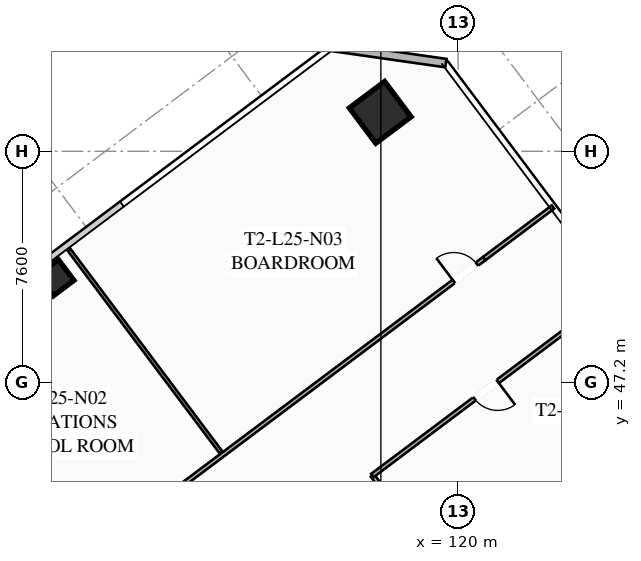
"""IFC4 building model, lengths in metres.
Left out: names, types, materials, properties, quantities, classifications, styles, units other than length and angle.
Written with IfcOpenShell. Run it as: python <this file> out.ifc"""

import sys

from ifc_helpers import new_model, si_unit, direction, frame, frame_2d, origin, origin_2d, place, context, subcontext, project, spatial, rectangle, hollow_rectangle, extrude, element, fill, save


model = new_model("IFC4")
c1 = context("Model", 3, precision=1e-05, world=origin(), true_north=direction((0.0, 1.0)))
c2 = subcontext(c1, "Body", "Model", "MODEL_VIEW")
j1 = project(units=[si_unit("LENGTHUNIT", "METRE"), si_unit("PLANEANGLEUNIT", "RADIAN")], contexts=[c1])
p1 = place(None, origin())
s1 = spatial("IfcSite", under=j1, at=p1, CompositionType="ELEMENT")
p2 = place(p1, origin())
s2 = spatial("IfcBuilding", under=s1, at=p2, CompositionType="ELEMENT")
p3 = place(p2, frame((0.0, 0.0, 95.6)))
s3 = spatial("IfcBuildingStorey", under=s2, at=p3, CompositionType="ELEMENT", Elevation=95.6)
p4 = place(p3, frame((117.44, 56.08, 0.0), z_axis=(0.0, 0.0, 1.0), x_axis=(0.799999996291, 0.600000004945, 0.0)))
e1 = element("IfcColumn", 1, at=p4, inside=s3, PredefinedType="COLUMN", context=c2, shape_type="SweptSolid", body=[
    extrude(hollow_rectangle(XDim=1.45, YDim=1.45, WallThickness=0.055, at=origin_2d()), origin(), (0.0, 0.0, 1.0), 3.35),
])
p5 = place(p3, frame((106.77, 50.64, 0.0), z_axis=(0.0, 0.0, 1.0), x_axis=(0.799999996291, 0.600000004945, 0.0)))
e2 = element("IfcColumn", 2, at=p5, inside=s3, PredefinedType="COLUMN", context=c2, shape_type="SweptSolid", body=[
    extrude(hollow_rectangle(XDim=0.85, YDim=0.85, WallThickness=0.035, at=origin_2d()), origin(), (0.0, 0.0, 1.0), 3.35),
])
p6 = place(p3, frame((115.82, 58.24, 0.0), z_axis=(0.0, 0.0, 1.0), x_axis=(0.989948214866, -0.141430307517, 0.0)))
e3 = element("IfcWall", 3, at=p6, inside=s3, PredefinedType="SOLIDWALL", context=c2, shape_type="SweptSolid", body=[
    extrude(rectangle(XDim=3.818, YDim=0.28, at=frame_2d((1.909, 0.0))), origin(), (0.0, 0.0, 1.0), 3.35),
])
p7 = place(p3, frame((119.824, 40.618, 0.0), z_axis=(0.0, 0.0, 1.0), x_axis=(-0.599982243973, 0.800013316712, 0.0)))
e4 = element("IfcWall", 4, at=p7, inside=s3, PredefinedType="PARTITIONING", context=c2, shape_type="SweptSolid", body=[
    extrude(rectangle(XDim=4.4, YDim=0.135, at=frame_2d((2.2, 0.0))), origin(), (0.0, 0.0, 1.0), 2.703),
])
p8 = place(p3, frame((98.276, 34.332, 0.0), z_axis=(0.0, 0.0, 1.0), x_axis=(0.800003113347, 0.599995848849, 0.0)))
e5 = element("IfcWall", 5, at=p8, inside=s3, PredefinedType="PARTITIONING", context=c2, shape_type="SweptSolid", body=[
    extrude(rectangle(XDim=28.23, YDim=0.135, at=frame_2d((14.115, 0.0))), origin(), (0.0, 0.0, 1.0), 2.703),
])
p9 = place(p8, frame((0.3, 0.0, 0.0)))
e6 = element("IfcOpeningElement", 6, at=p9, cuts=e5, PredefinedType="OPENING", context=c2, shape_type="SweptSolid", body=[
    extrude(rectangle(XDim=0.95, YDim=2.05, at=frame_2d((0.475, 1.025))), frame((0.0, 0.077, 0.0), z_axis=(0.0, -1.0, 0.0), x_axis=(1.0, 0.0, 0.0)), (0.0, 0.0, 1.0), 0.155),
])
p10 = place(p8, frame((11.023, 0.0, 0.0)))
e7 = element("IfcOpeningElement", 7, at=p10, cuts=e5, PredefinedType="OPENING", context=c2, shape_type="SweptSolid", body=[
    extrude(rectangle(XDim=0.95, YDim=2.05, at=frame_2d((0.475, 1.025))), frame((0.0, 0.077, 0.0), z_axis=(0.0, -1.0, 0.0), x_axis=(1.0, 0.0, 0.0)), (0.0, 0.0, 1.0), 0.155),
])
p11 = place(p8, frame((26.98, 0.0, 0.0)))
e8 = element("IfcOpeningElement", 8, at=p11, cuts=e5, PredefinedType="OPENING", context=c2, shape_type="SweptSolid", body=[
    extrude(rectangle(XDim=0.95, YDim=2.05, at=frame_2d((0.475, 1.025))), frame((0.0, 0.077, 0.0), z_axis=(0.0, -1.0, 0.0), x_axis=(1.0, 0.0, 0.0)), (0.0, 0.0, 1.0), 0.155),
])
p12 = place(p3, frame((120.86, 51.27, 0.0), z_axis=(0.0, 0.0, 1.0), x_axis=(0.799989647378, 0.600013803248, 0.0)))
e9 = element("IfcWall", 9, at=p12, inside=s3, PredefinedType="PARTITIONING", context=c2, shape_type="SweptSolid", body=[
    extrude(rectangle(XDim=2.83, YDim=0.135, at=frame_2d((1.415, 0.0))), origin(), (0.0, 0.0, 1.0), 2.703),
])
p13 = place(p3, frame((112.212, 44.884, 0.0), z_axis=(0.0, 0.0, 1.0), x_axis=(-0.600004678161, 0.799996491358, 0.0)))
e10 = element("IfcWall", 10, at=p13, inside=s3, PredefinedType="PARTITIONING", context=c2, shape_type="SweptSolid", body=[
    extrude(rectangle(XDim=8.35, YDim=0.11, at=frame_2d((4.175, 0.0))), origin(), (0.0, 0.0, 1.0), 2.703),
])
p14 = place(p3, frame((125.224, 50.168, 0.0), z_axis=(0.0, 0.0, 1.0), x_axis=(-0.8, -0.6, 0.0)))
e11 = element("IfcWall", 11, at=p14, inside=s3, PredefinedType="PARTITIONING", context=c2, shape_type="SweptSolid", body=[
    extrude(rectangle(XDim=10.05, YDim=0.135, at=frame_2d((5.025, 0.0))), origin(), (0.0, 0.0, 1.0), 2.703),
])
p15 = place(p14, frame((4.9, 0.0, 0.0)))
e12 = element("IfcOpeningElement", 12, at=p15, cuts=e11, PredefinedType="OPENING", context=c2, shape_type="SweptSolid", body=[
    extrude(rectangle(XDim=0.95, YDim=2.05, at=frame_2d((0.475, 1.025))), frame((0.0, 0.077, 0.0), z_axis=(0.0, -1.0, 0.0), x_axis=(1.0, 0.0, 0.0)), (0.0, 0.0, 1.0), 0.155),
])
p16 = place(p3, frame((127.864, 46.648, 0.0), z_axis=(0.0, 0.0, 1.0), x_axis=(-0.800007145523, -0.599990472518, 0.0)))
e13 = element("IfcWall", 13, at=p16, inside=s3, PredefinedType="PARTITIONING", context=c2, shape_type="SweptSolid", body=[
    extrude(rectangle(XDim=8.2, YDim=0.11, at=frame_2d((4.1, 0.0))), origin(), (0.0, 0.0, 1.0), 2.703),
])
p17 = place(p11, origin())
e14 = element("IfcDoor", 14, at=p17, inside=s3, OperationType="SINGLE_SWING_LEFT", PredefinedType="DOOR", context=c2, shape_type="SweptSolid", body=[
    extrude(rectangle(XDim=0.95, YDim=2.05, at=frame_2d((0.475, 1.025))), frame((0.0, 0.025, 0.0), z_axis=(0.0, -1.0, 0.0), x_axis=(1.0, 0.0, 0.0)), (0.0, 0.0, 1.0), 0.05),
])
fill(e8, e14)
p18 = place(p15, origin())
e15 = element("IfcDoor", 15, at=p18, inside=s3, OperationType="SINGLE_SWING_LEFT", PredefinedType="DOOR", context=c2, shape_type="SweptSolid", body=[
    extrude(rectangle(XDim=0.95, YDim=2.05, at=frame_2d((0.475, 1.025))), frame((0.0, 0.025, 0.0), z_axis=(0.0, -1.0, 0.0), x_axis=(1.0, 0.0, 0.0)), (0.0, 0.0, 1.0), 0.05),
])
fill(e12, e15)
save(model, sys.argv[1])
